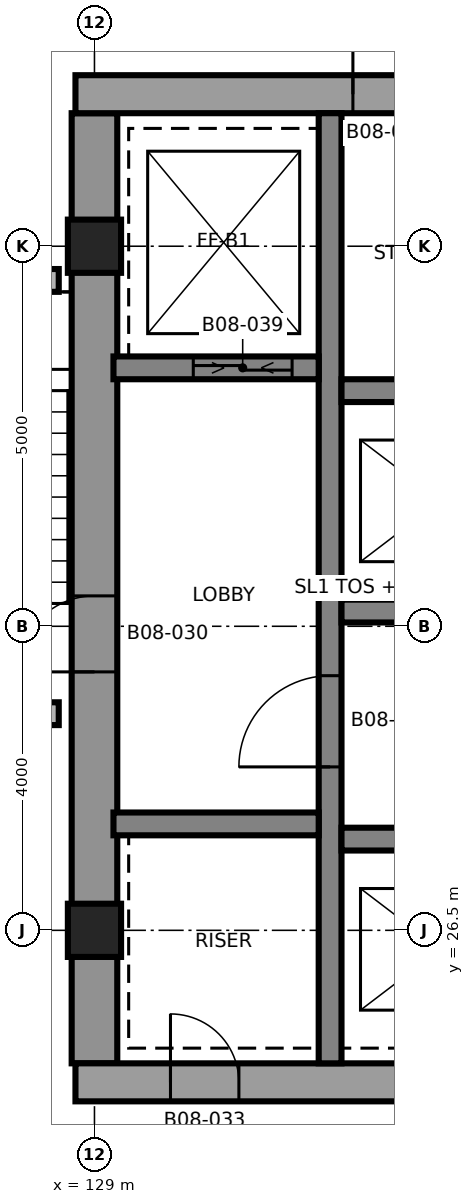
"""IFC4 building model, lengths in metres.
Left out: names, types, materials, properties, quantities, classifications, styles, units other than length and angle.
Written with IfcOpenShell. Run it as: python <this file> out.ifc"""

import sys

from ifc_helpers import new_model, si_unit, direction, frame, frame_2d, origin, origin_2d, place, context, subcontext, project, spatial, rectangle, extrude, element, fill, save


model = new_model("IFC4")
c1 = context("Model", 3, precision=1e-05, world=origin(), true_north=direction((0.0, 1.0)))
c2 = subcontext(c1, "Body", "Model", "MODEL_VIEW")
j1 = project(units=[si_unit("LENGTHUNIT", "METRE"), si_unit("PLANEANGLEUNIT", "RADIAN")], contexts=[c1])
p1 = place(None, origin())
s1 = spatial("IfcSite", under=j1, at=p1, CompositionType="ELEMENT")
p2 = place(p1, origin())
s2 = spatial("IfcBuilding", under=s1, at=p2, CompositionType="ELEMENT")
p3 = place(p2, frame((0.0, 0.0, 94.5)))
s3 = spatial("IfcBuildingStorey", under=s2, at=p3, CompositionType="ELEMENT", Elevation=94.5)
p4 = place(p3, frame((129.0, 24.75, 0.0), z_axis=(0.0, 0.0, 1.0), x_axis=(0.0, 1.0, 0.0)))
e1 = element("IfcWall", 1, at=p4, inside=s3, PredefinedType="SHEAR", context=c2, shape_type="SweptSolid", body=[
    extrude(rectangle(XDim=12.5, YDim=0.6, at=frame_2d((6.25, 0.0))), origin(), (0.0, 0.0, 1.0), 3.7),
])
p5 = place(p4, frame((5.15, 0.0, 0.0)))
e2 = element("IfcOpeningElement", 2, at=p5, cuts=e1, PredefinedType="OPENING", context=c2, shape_type="SweptSolid", body=[
    extrude(rectangle(XDim=1.0, YDim=2.1, at=frame_2d((0.5, 1.05))), frame((0.0, 0.31, 0.0), z_axis=(0.0, -1.0, 0.0), x_axis=(1.0, 0.0, 0.0)), (0.0, 0.0, 1.0), 0.62),
])
p6 = place(p3, frame((128.75, 24.5, 0.0), z_axis=(0.0, 0.0, 1.0), x_axis=(1.0, 0.0, 0.0)))
e3 = element("IfcWall", 3, at=p6, inside=s3, PredefinedType="SHEAR", context=c2, shape_type="SweptSolid", body=[
    extrude(rectangle(XDim=15.0, YDim=0.5, at=frame_2d((7.5, 0.0))), origin(), (0.0, 0.0, 1.0), 3.7),
])
p7 = place(p6, frame((9.65, 0.0, 0.0)))
e4 = element("IfcOpeningElement", 4, at=p7, cuts=e3, PredefinedType="OPENING", context=c2, shape_type="SweptSolid", body=[
    extrude(rectangle(XDim=1.5, YDim=2.1, at=frame_2d((0.75, 1.05))), frame((0.0, 0.26, 0.0), z_axis=(0.0, -1.0, 0.0), x_axis=(1.0, 0.0, 0.0)), (0.0, 0.0, 1.0), 0.52),
])
p8 = place(p6, frame((1.25, 0.0, 0.0)))
e5 = element("IfcOpeningElement", 5, at=p8, cuts=e3, PredefinedType="OPENING", context=c2, shape_type="SweptSolid", body=[
    extrude(rectangle(XDim=0.9, YDim=2.1, at=frame_2d((0.45, 1.05))), frame((0.0, 0.26, 0.0), z_axis=(0.0, -1.0, 0.0), x_axis=(1.0, 0.0, 0.0)), (0.0, 0.0, 1.0), 0.52),
])
p9 = place(p3, frame((128.75, 37.5, 0.0), z_axis=(0.0, 0.0, 1.0), x_axis=(1.0, 0.0, 0.0)))
e6 = element("IfcWall", 6, at=p9, inside=s3, PredefinedType="SHEAR", context=c2, shape_type="SweptSolid", body=[
    extrude(rectangle(XDim=15.0, YDim=0.5, at=frame_2d((7.5, 0.0))), origin(), (0.0, 0.0, 1.0), 3.7),
])
p10 = place(p9, frame((9.65, 0.0, 0.0)))
e7 = element("IfcOpeningElement", 7, at=p10, cuts=e6, PredefinedType="OPENING", context=c2, shape_type="SweptSolid", body=[
    extrude(rectangle(XDim=1.5, YDim=2.1, at=frame_2d((0.75, 1.05))), frame((0.0, 0.26, 0.0), z_axis=(0.0, -1.0, 0.0), x_axis=(1.0, 0.0, 0.0)), (0.0, 0.0, 1.0), 0.52),
])
p11 = place(p9, frame((12.85, 0.0, 0.0)))
e8 = element("IfcOpeningElement", 8, at=p11, cuts=e6, PredefinedType="OPENING", context=c2, shape_type="SweptSolid", body=[
    extrude(rectangle(XDim=0.9, YDim=2.1, at=frame_2d((0.45, 1.05))), frame((0.0, 0.26, 0.0), z_axis=(0.0, -1.0, 0.0), x_axis=(1.0, 0.0, 0.0)), (0.0, 0.0, 1.0), 0.52),
])
p12 = place(p9, frame((3.65, 0.0, 0.0)))
e9 = element("IfcOpeningElement", 9, at=p12, cuts=e6, PredefinedType="OPENING", context=c2, shape_type="SweptSolid", body=[
    extrude(rectangle(XDim=0.9, YDim=2.1, at=frame_2d((0.45, 1.05))), frame((0.0, 0.26, 0.0), z_axis=(0.0, -1.0, 0.0), x_axis=(1.0, 0.0, 0.0)), (0.0, 0.0, 1.0), 0.52),
])
p13 = place(p9, frame((5.55, 0.0, 0.0)))
e10 = element("IfcOpeningElement", 10, at=p13, cuts=e6, PredefinedType="OPENING", context=c2, shape_type="SweptSolid", body=[
    extrude(rectangle(XDim=0.9, YDim=2.1, at=frame_2d((0.45, 1.05))), frame((0.0, 0.26, 0.0), z_axis=(0.0, -1.0, 0.0), x_axis=(1.0, 0.0, 0.0)), (0.0, 0.0, 1.0), 0.52),
])
p14 = place(p9, frame((7.45, 0.0, 0.0)))
e11 = element("IfcOpeningElement", 11, at=p14, cuts=e6, PredefinedType="OPENING", context=c2, shape_type="SweptSolid", body=[
    extrude(rectangle(XDim=0.9, YDim=2.1, at=frame_2d((0.45, 1.05))), frame((0.0, 0.26, 0.0), z_axis=(0.0, -1.0, 0.0), x_axis=(1.0, 0.0, 0.0)), (0.0, 0.0, 1.0), 0.52),
])
p15 = place(p3, frame((132.1, 24.75, 0.0), z_axis=(0.0, 0.0, 1.0), x_axis=(0.0, 1.0, 0.0)))
e12 = element("IfcWall", 12, at=p15, inside=s3, PredefinedType="SHEAR", context=c2, shape_type="SweptSolid", body=[
    extrude(rectangle(XDim=12.5, YDim=0.3, at=frame_2d((6.25, 0.0))), origin(), (0.0, 0.0, 1.0), 3.7),
])
p16 = place(p15, frame((3.9, 0.0, 0.0)))
e13 = element("IfcOpeningElement", 13, at=p16, cuts=e12, PredefinedType="OPENING", context=c2, shape_type="SweptSolid", body=[
    extrude(rectangle(XDim=1.2, YDim=2.1, at=frame_2d((0.6, 1.05))), frame((0.0, 0.16, 0.0), z_axis=(0.0, -1.0, 0.0), x_axis=(1.0, 0.0, 0.0)), (0.0, 0.0, 1.0), 0.32),
])
p17 = place(p3, frame((132.25, 27.7, 0.0), z_axis=(0.0, 0.0, 1.0), x_axis=(1.0, 0.0, 0.0)))
e14 = element("IfcWall", 14, at=p17, inside=s3, PredefinedType="SHEAR", context=c2, shape_type="SweptSolid", body=[
    extrude(rectangle(XDim=5.5, YDim=0.3, at=frame_2d((2.75, 0.0))), origin(), (0.0, 0.0, 1.0), 3.7),
])
p18 = place(p17, frame((0.9, 0.0, 0.0)))
e15 = element("IfcOpeningElement", 15, at=p18, cuts=e14, PredefinedType="OPENING", context=c2, shape_type="SweptSolid", body=[
    extrude(rectangle(XDim=1.1, YDim=2.4, at=frame_2d((0.55, 1.2))), frame((0.0, 0.16, 0.0), z_axis=(0.0, -1.0, 0.0), x_axis=(1.0, 0.0, 0.0)), (0.0, 0.0, 1.0), 0.32),
])
p19 = place(p17, frame((3.8, 0.0, 0.0)))
e16 = element("IfcOpeningElement", 16, at=p19, cuts=e14, PredefinedType="OPENING", context=c2, shape_type="SweptSolid", body=[
    extrude(rectangle(XDim=1.1, YDim=2.4, at=frame_2d((0.55, 1.2))), frame((0.0, 0.16, 0.0), z_axis=(0.0, -1.0, 0.0), x_axis=(1.0, 0.0, 0.0)), (0.0, 0.0, 1.0), 0.32),
])
p20 = place(p3, frame((132.25, 30.7, 0.0), z_axis=(0.0, 0.0, 1.0), x_axis=(1.0, 0.0, 0.0)))
e17 = element("IfcWall", 17, at=p20, inside=s3, PredefinedType="SHEAR", context=c2, shape_type="SweptSolid", body=[
    extrude(rectangle(XDim=5.5, YDim=0.3, at=frame_2d((2.75, 0.0))), origin(), (0.0, 0.0, 1.0), 3.7),
])
p21 = place(p20, frame((0.9, 0.0, 0.0)))
e18 = element("IfcOpeningElement", 18, at=p21, cuts=e17, PredefinedType="OPENING", context=c2, shape_type="SweptSolid", body=[
    extrude(rectangle(XDim=1.1, YDim=2.4, at=frame_2d((0.55, 1.2))), frame((0.0, 0.16, 0.0), z_axis=(0.0, -1.0, 0.0), x_axis=(1.0, 0.0, 0.0)), (0.0, 0.0, 1.0), 0.32),
])
p22 = place(p20, frame((3.8, 0.0, 0.0)))
e19 = element("IfcOpeningElement", 19, at=p22, cuts=e17, PredefinedType="OPENING", context=c2, shape_type="SweptSolid", body=[
    extrude(rectangle(XDim=1.1, YDim=2.4, at=frame_2d((0.55, 1.2))), frame((0.0, 0.16, 0.0), z_axis=(0.0, -1.0, 0.0), x_axis=(1.0, 0.0, 0.0)), (0.0, 0.0, 1.0), 0.32),
])
p23 = place(p3, frame((132.25, 33.6, 0.0), z_axis=(0.0, 0.0, 1.0), x_axis=(1.0, 0.0, 0.0)))
e20 = element("IfcWall", 20, at=p23, inside=s3, PredefinedType="SHEAR", context=c2, shape_type="SweptSolid", body=[
    extrude(rectangle(XDim=5.5, YDim=0.3, at=frame_2d((2.75, 0.0))), origin(), (0.0, 0.0, 1.0), 3.7),
])
p24 = place(p3, frame((129.25, 27.9, 0.0), z_axis=(0.0, 0.0, 1.0), x_axis=(1.0, 0.0, 0.0)))
e21 = element("IfcWall", 21, at=p24, inside=s3, PredefinedType="SHEAR", context=c2, shape_type="SweptSolid", body=[
    extrude(rectangle(XDim=2.7, YDim=0.3, at=frame_2d((1.35, 0.0))), origin(), (0.0, 0.0, 1.0), 3.7),
])
p25 = place(p3, frame((129.25, 33.9, 0.0), z_axis=(0.0, 0.0, 1.0), x_axis=(1.0, 0.0, 0.0)))
e22 = element("IfcWall", 22, at=p25, inside=s3, PredefinedType="SHEAR", context=c2, shape_type="SweptSolid", body=[
    extrude(rectangle(XDim=2.7, YDim=0.3, at=frame_2d((1.35, 0.0))), origin(), (0.0, 0.0, 1.0), 3.7),
])
p26 = place(p25, frame((1.05, 0.0, 0.0)))
e23 = element("IfcOpeningElement", 23, at=p26, cuts=e22, PredefinedType="OPENING", context=c2, shape_type="SweptSolid", body=[
    extrude(rectangle(XDim=1.3, YDim=2.4, at=frame_2d((0.65, 1.2))), frame((0.0, 0.16, 0.0), z_axis=(0.0, -1.0, 0.0), x_axis=(1.0, 0.0, 0.0)), (0.0, 0.0, 1.0), 0.32),
])
for number, where, z_axis, x_axis in (
    (24, (129.0, 26.5, 0.0), (0.0, 0.0, 1.0), (1.0, 0.0, 0.0)),
    (25, (129.0, 35.5, 0.0), (0.0, 0.0, 1.0), (1.0, 0.0, 0.0)),
):
    element("IfcColumn", number, at=place(p3, frame(where, z_axis=z_axis, x_axis=x_axis)), inside=s3, PredefinedType="COLUMN", context=c2, shape_type="SweptSolid", body=[
        extrude(rectangle(XDim=0.7, YDim=0.7, at=origin_2d()), origin(), (0.0, 0.0, 1.0), 3.7),
    ])
p27 = place(p3, frame((125.7, 29.35, 0.0), z_axis=(0.0, 0.0, 1.0), x_axis=(1.0, 0.0, 0.0)))
e26 = element("IfcWall", 26, at=p27, inside=s3, PredefinedType="SHEAR", context=c2, shape_type="SweptSolid", body=[
    extrude(rectangle(XDim=2.83, YDim=0.3, at=frame_2d((1.415, 0.0))), origin(), (0.0, 0.0, 1.0), 3.4),
])
p28 = place(p27, frame((0.975, 0.0, 0.0)))
e27 = element("IfcOpeningElement", 27, at=p28, cuts=e26, PredefinedType="OPENING", context=c2, shape_type="SweptSolid", body=[
    extrude(rectangle(XDim=1.2, YDim=2.1, at=frame_2d((0.6, 1.05))), frame((0.0, 0.16, 0.0), z_axis=(0.0, -1.0, 0.0), x_axis=(1.0, 0.0, 0.0)), (0.0, 0.0, 1.0), 0.32),
])
p29 = place(p3, frame((125.7, 35.05, 0.0), z_axis=(0.0, 0.0, 1.0), x_axis=(1.0, 0.0, 0.0)))
e28 = element("IfcWall", 28, at=p29, inside=s3, PredefinedType="SHEAR", context=c2, shape_type="SweptSolid", body=[
    extrude(rectangle(XDim=2.83, YDim=0.3, at=frame_2d((1.415, 0.0))), origin(), (0.0, 0.0, 1.0), 3.4),
])
p30 = place(p16, origin())
e29 = element("IfcDoor", 29, at=p30, inside=s3, OperationType="SINGLE_SWING_LEFT", PredefinedType="DOOR", context=c2, shape_type="SweptSolid", body=[
    extrude(rectangle(XDim=1.2, YDim=2.1, at=frame_2d((0.6, 1.05))), frame((0.0, 0.025, 0.0), z_axis=(0.0, -1.0, 0.0), x_axis=(1.0, 0.0, 0.0)), (0.0, 0.0, 1.0), 0.05),
])
fill(e13, e29)
p31 = place(p5, origin())
e30 = element("IfcDoor", 30, at=p31, inside=s3, OperationType="SINGLE_SWING_RIGHT", PredefinedType="DOOR", context=c2, shape_type="SweptSolid", body=[
    extrude(rectangle(XDim=1.0, YDim=2.1, at=frame_2d((0.5, 1.05))), frame((0.0, 0.025, 0.0), z_axis=(0.0, -1.0, 0.0), x_axis=(1.0, 0.0, 0.0)), (0.0, 0.0, 1.0), 0.05),
])
fill(e2, e30)
p32 = place(p8, origin())
e31 = element("IfcDoor", 31, at=p32, inside=s3, OperationType="SINGLE_SWING_LEFT", PredefinedType="DOOR", context=c2, shape_type="SweptSolid", body=[
    extrude(rectangle(XDim=0.9, YDim=2.1, at=frame_2d((0.45, 1.05))), frame((0.0, 0.025, 0.0), z_axis=(0.0, -1.0, 0.0), x_axis=(1.0, 0.0, 0.0)), (0.0, 0.0, 1.0), 0.05),
])
fill(e5, e31)
p33 = place(p26, origin())
e32 = element("IfcDoor", 32, at=p33, inside=s3, OperationType="SLIDING_TO_LEFT", PredefinedType="DOOR", context=c2, shape_type="SweptSolid", body=[
    extrude(rectangle(XDim=1.3, YDim=2.4, at=frame_2d((0.65, 1.2))), frame((0.0, 0.025, 0.0), z_axis=(0.0, -1.0, 0.0), x_axis=(1.0, 0.0, 0.0)), (0.0, 0.0, 1.0), 0.05),
])
fill(e23, e32)
p34 = place(p12, origin())
e33 = element("IfcDoor", 33, at=p34, inside=s3, OperationType="SINGLE_SWING_LEFT", PredefinedType="DOOR", context=c2, shape_type="SweptSolid", body=[
    extrude(rectangle(XDim=0.9, YDim=2.1, at=frame_2d((0.45, 1.05))), frame((0.0, 0.025, 0.0), z_axis=(0.0, -1.0, 0.0), x_axis=(1.0, 0.0, 0.0)), (0.0, 0.0, 1.0), 0.05),
])
fill(e9, e33)
save(model, sys.argv[1])
